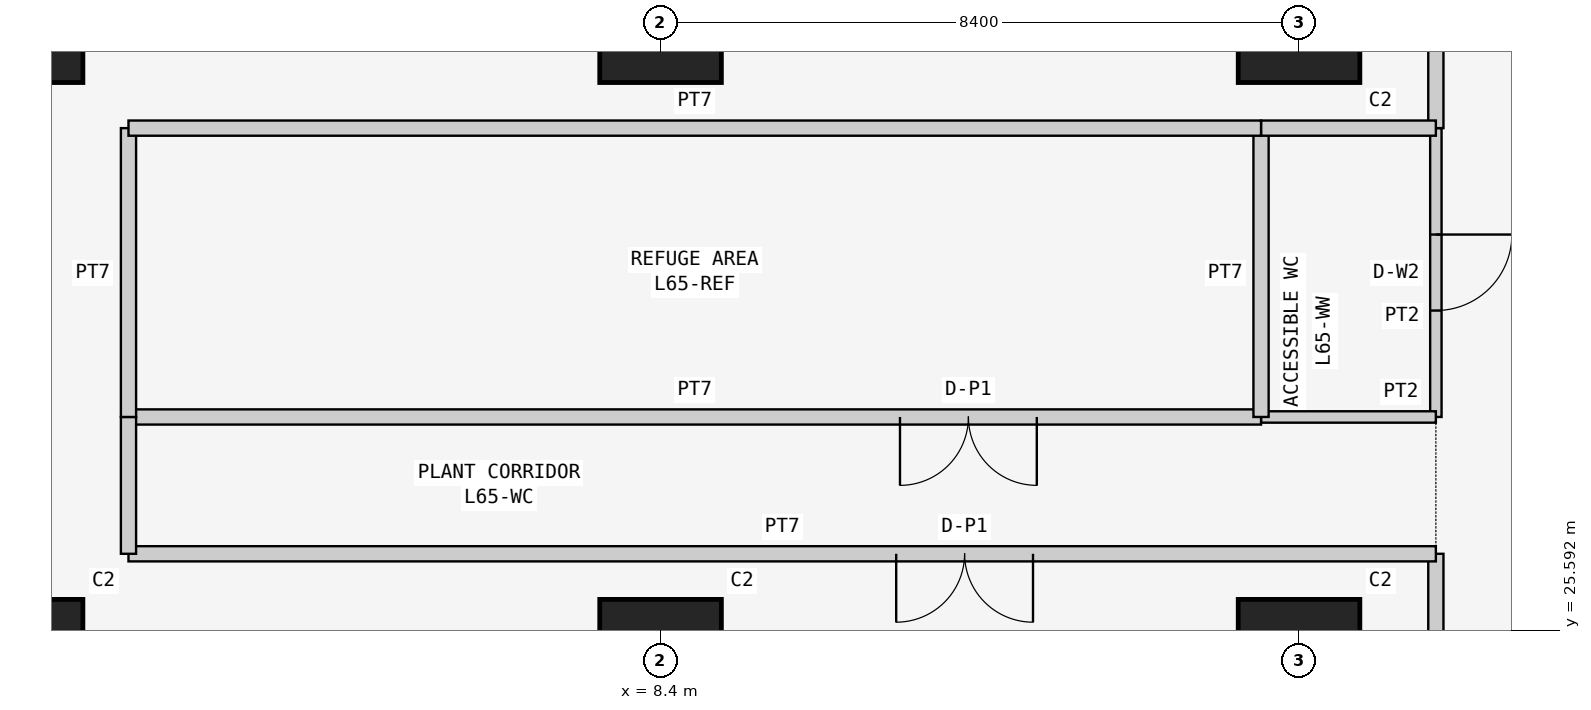
"""IFC4 building model, lengths in metres.
Left out: names, types, materials, properties, quantities, classifications, styles, units other than length and angle.
Written with IfcOpenShell. Run it as: python <this file> out.ifc"""

import sys

from ifc_helpers import new_model, si_unit, direction, frame, frame_2d, origin, origin_2d, place, context, subcontext, project, spatial, rectangle, extrude, element, fill, save


model = new_model("IFC4")
c1 = context("Model", 3, precision=1e-05, world=origin(), true_north=direction((0.0, 1.0)))
c2 = subcontext(c1, "Body", "Model", "MODEL_VIEW")
j1 = project(units=[si_unit("LENGTHUNIT", "METRE"), si_unit("PLANEANGLEUNIT", "RADIAN")], contexts=[c1])
p1 = place(None, origin())
s1 = spatial("IfcSite", under=j1, at=p1, CompositionType="ELEMENT")
p2 = place(p1, origin())
s2 = spatial("IfcBuilding", under=s1, at=p2, CompositionType="ELEMENT")
p3 = place(p2, frame((0.0, 0.0, 248.1)))
s3 = spatial("IfcBuildingStorey", under=s2, at=p3, CompositionType="ELEMENT", Elevation=248.1)
for number, where, z_axis, x_axis in (
    (1, (0.0, 25.2, 0.0), (0.0, 0.0, 1.0), (1.0, 0.0, 0.0)),
    (2, (0.0, 33.6, 0.0), (0.0, 0.0, 1.0), (1.0, 0.0, 0.0)),
    (3, (8.4, 25.2, 0.0), (0.0, 0.0, 1.0), (1.0, 0.0, 0.0)),
    (4, (8.4, 33.6, 0.0), (0.0, 0.0, 1.0), (1.0, 0.0, 0.0)),
    (5, (16.8, 25.2, 0.0), (0.0, 0.0, 1.0), (1.0, 0.0, 0.0)),
    (6, (16.8, 33.6, 0.0), (0.0, 0.0, 1.0), (1.0, 0.0, 0.0)),
):
    element("IfcColumn", number, at=place(p3, frame(where, z_axis=z_axis, x_axis=x_axis)), inside=s3, PredefinedType="COLUMN", context=c2, shape_type="SweptSolid", body=[
        extrude(rectangle(XDim=1.6, YDim=1.6, at=origin_2d()), origin(), (0.0, 0.0, 1.0), 6.0),
    ])
p4 = place(p3, frame((18.6, 28.4, 0.0), z_axis=(0.0, 0.0, 1.0), x_axis=(0.0, 1.0, 0.0)))
e7 = element("IfcWall", 7, at=p4, inside=s3, PredefinedType="PARTITIONING", context=c2, shape_type="SweptSolid", body=[
    extrude(rectangle(XDim=3.8, YDim=0.15, at=frame_2d((1.9, 0.0))), origin(), (0.0, 0.0, 1.0), 5.85),
])
p5 = place(p4, frame((1.4, 0.0, 0.0)))
e8 = element("IfcOpeningElement", 8, at=p5, cuts=e7, PredefinedType="OPENING", context=c2, shape_type="SweptSolid", body=[
    extrude(rectangle(XDim=1.0, YDim=2.1, at=frame_2d((0.5, 1.05))), frame((0.0, 0.085, 0.0), z_axis=(0.0, -1.0, 0.0), x_axis=(1.0, 0.0, 0.0)), (0.0, 0.0, 1.0), 0.17),
])
p6 = place(p3, frame((18.6, 23.9, 0.0), z_axis=(0.0, 0.0, 1.0), x_axis=(0.0, 1.0, 0.0)))
e9 = element("IfcWall", 9, at=p6, inside=s3, PredefinedType="PARTITIONING", context=c2, shape_type="SweptSolid", body=[
    extrude(rectangle(XDim=2.7, YDim=0.2, at=frame_2d((1.35, 0.0))), origin(), (0.0, 0.0, 1.0), 5.85),
])
p7 = place(p3, frame((18.6, 32.2, 0.0), z_axis=(0.0, 0.0, 1.0), x_axis=(0.0, 1.0, 0.0)))
e10 = element("IfcWall", 10, at=p7, inside=s3, PredefinedType="PARTITIONING", context=c2, shape_type="SweptSolid", body=[
    extrude(rectangle(XDim=2.7, YDim=0.2, at=frame_2d((1.35, 0.0))), origin(), (0.0, 0.0, 1.0), 5.85),
])
p8 = place(p3, frame((16.3, 28.4, 0.0), z_axis=(0.0, 0.0, 1.0), x_axis=(1.0, 0.0, 0.0)))
e11 = element("IfcWall", 11, at=p8, inside=s3, PredefinedType="PARTITIONING", context=c2, shape_type="SweptSolid", body=[
    extrude(rectangle(XDim=2.3, YDim=0.15, at=frame_2d((1.15, 0.0))), origin(), (0.0, 0.0, 1.0), 5.85),
])
p9 = place(p3, frame((1.4, 28.4, 0.0), z_axis=(0.0, 0.0, 1.0), x_axis=(1.0, 0.0, 0.0)))
e12 = element("IfcWall", 12, at=p9, inside=s3, PredefinedType="PARTITIONING", context=c2, shape_type="SweptSolid", body=[
    extrude(rectangle(XDim=14.9, YDim=0.2, at=frame_2d((7.45, 0.0))), origin(), (0.0, 0.0, 1.0), 5.75),
])
p10 = place(p9, frame((10.15, 0.0, 0.0)))
e13 = element("IfcOpeningElement", 13, at=p10, cuts=e12, PredefinedType="OPENING", context=c2, shape_type="SweptSolid", body=[
    extrude(rectangle(XDim=1.8, YDim=2.4, at=frame_2d((0.9, 1.2))), frame((0.0, 0.11, 0.0), z_axis=(0.0, -1.0, 0.0), x_axis=(1.0, 0.0, 0.0)), (0.0, 0.0, 1.0), 0.22),
])
p11 = place(p3, frame((18.6, 26.6, 0.0), z_axis=(0.0, 0.0, 1.0), x_axis=(-1.0, 0.0, 0.0)))
e14 = element("IfcWall", 14, at=p11, inside=s3, PredefinedType="PARTITIONING", context=c2, shape_type="SweptSolid", body=[
    extrude(rectangle(XDim=17.2, YDim=0.2, at=frame_2d((8.6, 0.0))), origin(), (0.0, 0.0, 1.0), 5.75),
])
p12 = place(p11, frame((5.3, 0.0, 0.0)))
e15 = element("IfcOpeningElement", 15, at=p12, cuts=e14, PredefinedType="OPENING", context=c2, shape_type="SweptSolid", body=[
    extrude(rectangle(XDim=1.8, YDim=2.4, at=frame_2d((0.9, 1.2))), frame((0.0, 0.11, 0.0), z_axis=(0.0, -1.0, 0.0), x_axis=(1.0, 0.0, 0.0)), (0.0, 0.0, 1.0), 0.22),
])
p13 = place(p3, frame((1.4, 26.6, 0.0), z_axis=(0.0, 0.0, 1.0), x_axis=(0.0, 1.0, 0.0)))
e16 = element("IfcWall", 16, at=p13, inside=s3, PredefinedType="PARTITIONING", context=c2, shape_type="SweptSolid", body=[
    extrude(rectangle(XDim=1.8, YDim=0.2, at=frame_2d((0.9, 0.0))), origin(), (0.0, 0.0, 1.0), 5.75),
])
p14 = place(p3, frame((16.3, 28.4, 0.0), z_axis=(0.0, 0.0, 1.0), x_axis=(0.0, 1.0, 0.0)))
e17 = element("IfcWall", 17, at=p14, inside=s3, PredefinedType="PARTITIONING", context=c2, shape_type="SweptSolid", body=[
    extrude(rectangle(XDim=3.8, YDim=0.2, at=frame_2d((1.9, 0.0))), origin(), (0.0, 0.0, 1.0), 5.85),
])
p15 = place(p3, frame((16.3, 32.2, 0.0), z_axis=(0.0, 0.0, 1.0), x_axis=(1.0, 0.0, 0.0)))
e18 = element("IfcWall", 18, at=p15, inside=s3, PredefinedType="PARTITIONING", context=c2, shape_type="SweptSolid", body=[
    extrude(rectangle(XDim=2.3, YDim=0.2, at=frame_2d((1.15, 0.0))), origin(), (0.0, 0.0, 1.0), 5.85),
])
p16 = place(p3, frame((1.4, 28.4, 0.0), z_axis=(0.0, 0.0, 1.0), x_axis=(0.0, 1.0, 0.0)))
e19 = element("IfcWall", 19, at=p16, inside=s3, PredefinedType="PARTITIONING", context=c2, shape_type="SweptSolid", body=[
    extrude(rectangle(XDim=3.8, YDim=0.2, at=frame_2d((1.9, 0.0))), origin(), (0.0, 0.0, 1.0), 5.75),
])
p17 = place(p3, frame((1.4, 32.2, 0.0), z_axis=(0.0, 0.0, 1.0), x_axis=(1.0, 0.0, 0.0)))
e20 = element("IfcWall", 20, at=p17, inside=s3, PredefinedType="PARTITIONING", context=c2, shape_type="SweptSolid", body=[
    extrude(rectangle(XDim=14.9, YDim=0.2, at=frame_2d((7.45, 0.0))), origin(), (0.0, 0.0, 1.0), 5.75),
])
p18 = place(p5, frame((1.0, 0.0, 0.0), z_axis=(0.0, 0.0, 1.0), x_axis=(-1.0, 0.0, 0.0)))
e21 = element("IfcDoor", 21, at=p18, inside=s3, OperationType="SINGLE_SWING_LEFT", PredefinedType="DOOR", context=c2, shape_type="SweptSolid", body=[
    extrude(rectangle(XDim=1.0, YDim=2.1, at=frame_2d((0.5, 1.05))), frame((0.0, 0.025, 0.0), z_axis=(0.0, -1.0, 0.0), x_axis=(1.0, 0.0, 0.0)), (0.0, 0.0, 1.0), 0.05),
])
fill(e8, e21)
p19 = place(p10, frame((1.8, 0.0, 0.0), z_axis=(0.0, 0.0, 1.0), x_axis=(-1.0, 0.0, 0.0)))
e22 = element("IfcDoor", 22, at=p19, inside=s3, OperationType="DOUBLE_DOOR_SINGLE_SWING", PredefinedType="DOOR", context=c2, shape_type="SweptSolid", body=[
    extrude(rectangle(XDim=1.8, YDim=2.4, at=frame_2d((0.9, 1.2))), frame((0.0, 0.025, 0.0), z_axis=(0.0, -1.0, 0.0), x_axis=(1.0, 0.0, 0.0)), (0.0, 0.0, 1.0), 0.05),
])
fill(e13, e22)
p20 = place(p12, origin())
e23 = element("IfcDoor", 23, at=p20, inside=s3, OperationType="DOUBLE_DOOR_SINGLE_SWING", PredefinedType="DOOR", context=c2, shape_type="SweptSolid", body=[
    extrude(rectangle(XDim=1.8, YDim=2.4, at=frame_2d((0.9, 1.2))), frame((0.0, 0.025, 0.0), z_axis=(0.0, -1.0, 0.0), x_axis=(1.0, 0.0, 0.0)), (0.0, 0.0, 1.0), 0.05),
])
fill(e15, e23)
save(model, sys.argv[1])
